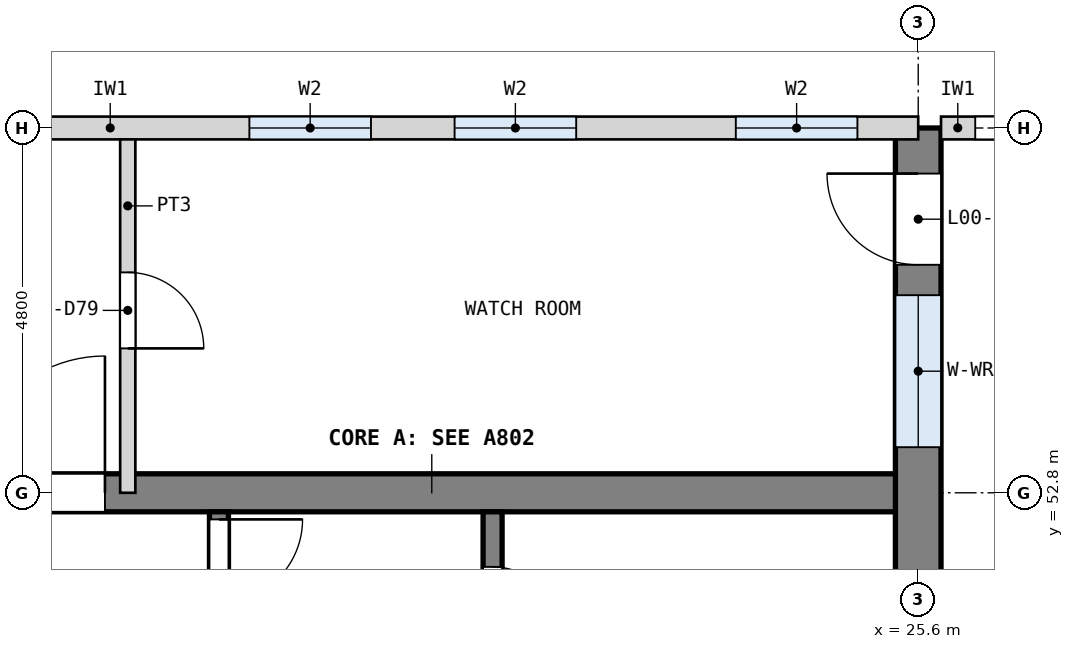
"""IFC4 building model, lengths in metres.
Left out: names, types, materials, properties, quantities, classifications, styles, units other than length and angle.
Written with IfcOpenShell. Run it as: python <this file> out.ifc"""

import sys

from ifc_helpers import new_model, si_unit, direction, frame, frame_2d, origin, place, context, subcontext, project, spatial, rectangle, extrude, element, fill, save


model = new_model("IFC4")
c1 = context("Model", 3, precision=1e-05, world=origin(), true_north=direction((0.0, 1.0)))
c2 = subcontext(c1, "Body", "Model", "MODEL_VIEW")
j1 = project(units=[si_unit("LENGTHUNIT", "METRE"), si_unit("PLANEANGLEUNIT", "RADIAN")], contexts=[c1])
p1 = place(None, origin())
s1 = spatial("IfcSite", under=j1, at=p1, CompositionType="ELEMENT")
p2 = place(p1, origin())
s2 = spatial("IfcBuilding", under=s1, at=p2, CompositionType="ELEMENT")
p3 = place(p2, origin())
s3 = spatial("IfcBuildingStorey", under=s2, at=p3, CompositionType="ELEMENT", Elevation=0.0)
p4 = place(p3, frame((12.55, 52.8, 0.0), z_axis=(0.0, 0.0, 1.0), x_axis=(1.0, 0.0, 0.0)))
e1 = element("IfcWall", 1, at=p4, inside=s3, PredefinedType="SHEAR", context=c2, shape_type="SweptSolid", body=[
    extrude(rectangle(XDim=13.3, YDim=0.5, at=frame_2d((6.65, 0.0))), origin(), (0.0, 0.0, 1.0), 4.2),
])
p5 = place(p4, frame((0.55, 0.0, 0.0)))
e2 = element("IfcOpeningElement", 2, at=p5, cuts=e1, PredefinedType="OPENING", context=c2, shape_type="SweptSolid", body=[
    extrude(rectangle(XDim=1.8, YDim=2.1, at=frame_2d((0.9, 1.05))), frame((0.0, 0.26, 0.0), z_axis=(0.0, -1.0, 0.0), x_axis=(1.0, 0.0, 0.0)), (0.0, 0.0, 1.0), 0.52),
])
p6 = place(p3, frame((25.6, 28.8, 0.0), z_axis=(0.0, 0.0, 1.0), x_axis=(0.0, 1.0, 0.0)))
e3 = element("IfcWall", 3, at=p6, inside=s3, PredefinedType="SHEAR", context=c2, shape_type="SweptSolid", body=[
    extrude(rectangle(XDim=28.8, YDim=0.6, at=frame_2d((14.4, 0.0))), origin(), (0.0, 0.0, 1.0), 4.2),
])
p7 = place(p6, frame((0.5, 0.0, 0.0)))
e4 = element("IfcOpeningElement", 4, at=p7, cuts=e3, PredefinedType="OPENING", context=c2, shape_type="SweptSolid", body=[
    extrude(rectangle(XDim=1.2, YDim=2.1, at=frame_2d((0.6, 1.05))), frame((0.0, 0.31, 0.0), z_axis=(0.0, -1.0, 0.0), x_axis=(1.0, 0.0, 0.0)), (0.0, 0.0, 1.0), 0.62),
])
p8 = place(p6, frame((3.1, 0.0, 0.0)))
e5 = element("IfcOpeningElement", 5, at=p8, cuts=e3, PredefinedType="OPENING", context=c2, shape_type="SweptSolid", body=[
    extrude(rectangle(XDim=1.2, YDim=2.1, at=frame_2d((0.6, 1.05))), frame((0.0, 0.31, 0.0), z_axis=(0.0, -1.0, 0.0), x_axis=(1.0, 0.0, 0.0)), (0.0, 0.0, 1.0), 0.62),
])
p9 = place(p6, frame((27.0, 0.0, 0.0)))
e6 = element("IfcOpeningElement", 6, at=p9, cuts=e3, PredefinedType="OPENING", context=c2, shape_type="SweptSolid", body=[
    extrude(rectangle(XDim=1.2, YDim=2.1, at=frame_2d((0.6, 1.05))), frame((0.0, 0.31, 0.0), z_axis=(0.0, -1.0, 0.0), x_axis=(1.0, 0.0, 0.0)), (0.0, 0.0, 1.0), 0.62),
])
p10 = place(p6, frame((24.6, 0.0, 1.0)))
e7 = element("IfcOpeningElement", 7, at=p10, cuts=e3, PredefinedType="OPENING", context=c2, shape_type="SweptSolid", body=[
    extrude(rectangle(XDim=2.0, YDim=1.2, at=frame_2d((1.0, 0.6))), frame((0.0, 0.31, 0.0), z_axis=(0.0, -1.0, 0.0), x_axis=(1.0, 0.0, 0.0)), (0.0, 0.0, 1.0), 0.62),
])
p11 = place(p3, frame((13.15, 57.6, 0.0), z_axis=(0.0, 0.0, 1.0), x_axis=(1.0, 0.0, 0.0)))
e8 = element("IfcWall", 8, at=p11, inside=s3, PredefinedType="SOLIDWALL", context=c2, shape_type="SweptSolid", body=[
    extrude(rectangle(XDim=12.45, YDim=0.3, at=frame_2d((6.225, 0.0))), origin(), (0.0, 0.0, 1.0), 3.0),
])
p12 = place(p11, frame((6.35, 0.0, 0.3)))
e9 = element("IfcOpeningElement", 9, at=p12, cuts=e8, PredefinedType="OPENING", context=c2, shape_type="SweptSolid", body=[
    extrude(rectangle(XDim=1.6, YDim=2.4, at=frame_2d((0.8, 1.2))), frame((0.0, 0.16, 0.0), z_axis=(0.0, -1.0, 0.0), x_axis=(1.0, 0.0, 0.0)), (0.0, 0.0, 1.0), 0.32),
])
p13 = place(p11, frame((3.65, 0.0, 0.3)))
e10 = element("IfcOpeningElement", 10, at=p13, cuts=e8, PredefinedType="OPENING", context=c2, shape_type="SweptSolid", body=[
    extrude(rectangle(XDim=1.6, YDim=2.4, at=frame_2d((0.8, 1.2))), frame((0.0, 0.16, 0.0), z_axis=(0.0, -1.0, 0.0), x_axis=(1.0, 0.0, 0.0)), (0.0, 0.0, 1.0), 0.32),
])
p14 = place(p11, frame((10.05, 0.0, 0.3)))
e11 = element("IfcOpeningElement", 11, at=p14, cuts=e8, PredefinedType="OPENING", context=c2, shape_type="SweptSolid", body=[
    extrude(rectangle(XDim=1.6, YDim=2.4, at=frame_2d((0.8, 1.2))), frame((0.0, 0.16, 0.0), z_axis=(0.0, -1.0, 0.0), x_axis=(1.0, 0.0, 0.0)), (0.0, 0.0, 1.0), 0.32),
])
p15 = place(p3, frame((25.9, 57.6, 0.0), z_axis=(0.0, 0.0, 1.0), x_axis=(1.0, 0.0, 0.0)))
e12 = element("IfcWall", 12, at=p15, inside=s3, PredefinedType="SOLIDWALL", context=c2, shape_type="SweptSolid", body=[
    extrude(rectangle(XDim=5.3, YDim=0.3, at=frame_2d((2.65, 0.0))), origin(), (0.0, 0.0, 1.0), 5.1),
])
p16 = place(p15, frame((0.45, 0.0, 0.0)))
e13 = element("IfcOpeningElement", 13, at=p16, cuts=e12, PredefinedType="OPENING", context=c2, shape_type="SweptSolid", body=[
    extrude(rectangle(XDim=4.4, YDim=4.5, at=frame_2d((2.2, 2.25))), frame((0.0, 0.16, 0.0), z_axis=(0.0, -1.0, 0.0), x_axis=(1.0, 0.0, 0.0)), (0.0, 0.0, 1.0), 0.32),
])
p17 = place(p3, frame((16.4, 46.475, 0.0), z_axis=(0.0, 0.0, 1.0), x_axis=(0.0, 1.0, 0.0)))
e14 = element("IfcWall", 14, at=p17, inside=s3, PredefinedType="SOLIDWALL", context=c2, shape_type="SweptSolid", body=[
    extrude(rectangle(XDim=6.075, YDim=0.25, at=frame_2d((3.038, 0.0))), origin(), (0.0, 0.0, 1.0), 3.9),
])
p18 = place(p17, frame((4.875, 0.0, 0.0)))
e15 = element("IfcOpeningElement", 15, at=p18, cuts=e14, PredefinedType="OPENING", context=c2, shape_type="SweptSolid", body=[
    extrude(rectangle(XDim=1.1, YDim=2.1, at=frame_2d((0.55, 1.05))), frame((0.0, 0.135, 0.0), z_axis=(0.0, -1.0, 0.0), x_axis=(1.0, 0.0, 0.0)), (0.0, 0.0, 1.0), 0.27),
])
p19 = place(p3, frame((20.0, 46.475, 0.0), z_axis=(0.0, 0.0, 1.0), x_axis=(0.0, 1.0, 0.0)))
e16 = element("IfcWall", 16, at=p19, inside=s3, PredefinedType="SOLIDWALL", context=c2, shape_type="SweptSolid", body=[
    extrude(rectangle(XDim=6.075, YDim=0.25, at=frame_2d((3.038, 0.0))), origin(), (0.0, 0.0, 1.0), 3.9),
])
p20 = place(p19, frame((1.312, 0.0, 0.0)))
e17 = element("IfcOpeningElement", 17, at=p20, cuts=e16, PredefinedType="OPENING", context=c2, shape_type="SweptSolid", body=[
    extrude(rectangle(XDim=1.0, YDim=2.1, at=frame_2d((0.5, 1.05))), frame((0.0, 0.135, 0.0), z_axis=(0.0, -1.0, 0.0), x_axis=(1.0, 0.0, 0.0)), (0.0, 0.0, 1.0), 0.27),
])
p21 = place(p19, frame((4.45, 0.0, 0.0)))
e18 = element("IfcOpeningElement", 18, at=p21, cuts=e16, PredefinedType="OPENING", context=c2, shape_type="SweptSolid", body=[
    extrude(rectangle(XDim=0.9, YDim=2.1, at=frame_2d((0.45, 1.05))), frame((0.0, 0.135, 0.0), z_axis=(0.0, -1.0, 0.0), x_axis=(1.0, 0.0, 0.0)), (0.0, 0.0, 1.0), 0.27),
])
p22 = place(p3, frame((15.2, 52.8, 0.0), z_axis=(0.0, 0.0, 1.0), x_axis=(0.0, 1.0, 0.0)))
e19 = element("IfcWall", 19, at=p22, inside=s3, PredefinedType="PARTITIONING", context=c2, shape_type="SweptSolid", body=[
    extrude(rectangle(XDim=4.65, YDim=0.2, at=frame_2d((2.325, 0.0))), origin(), (0.0, 0.0, 1.0), 3.9),
])
p23 = place(p22, frame((1.9, 0.0, 0.0)))
e20 = element("IfcOpeningElement", 20, at=p23, cuts=e19, PredefinedType="OPENING", context=c2, shape_type="SweptSolid", body=[
    extrude(rectangle(XDim=1.0, YDim=2.1, at=frame_2d((0.5, 1.05))), frame((0.0, 0.11, 0.0), z_axis=(0.0, -1.0, 0.0), x_axis=(1.0, 0.0, 0.0)), (0.0, 0.0, 1.0), 0.22),
])
p24 = place(p16, origin())
e21 = element("IfcDoor", 21, at=p24, inside=s3, OperationType="ROLLINGUP", PredefinedType="DOOR", context=c2, shape_type="SweptSolid", body=[
    extrude(rectangle(XDim=4.4, YDim=4.5, at=frame_2d((2.2, 2.25))), frame((0.0, 0.025, 0.0), z_axis=(0.0, -1.0, 0.0), x_axis=(1.0, 0.0, 0.0)), (0.0, 0.0, 1.0), 0.05),
])
fill(e13, e21)
p25 = place(p18, frame((1.1, 0.0, 0.0), z_axis=(0.0, 0.0, 1.0), x_axis=(-1.0, 0.0, 0.0)))
e22 = element("IfcDoor", 22, at=p25, inside=s3, OperationType="SINGLE_SWING_LEFT", PredefinedType="DOOR", context=c2, shape_type="SweptSolid", body=[
    extrude(rectangle(XDim=1.1, YDim=2.1, at=frame_2d((0.55, 1.05))), frame((0.0, 0.025, 0.0), z_axis=(0.0, -1.0, 0.0), x_axis=(1.0, 0.0, 0.0)), (0.0, 0.0, 1.0), 0.05),
])
fill(e15, e22)
p26 = place(p21, frame((0.9, 0.0, 0.0), z_axis=(0.0, 0.0, 1.0), x_axis=(-1.0, 0.0, 0.0)))
e23 = element("IfcDoor", 23, at=p26, inside=s3, OperationType="SINGLE_SWING_RIGHT", PredefinedType="DOOR", context=c2, shape_type="SweptSolid", body=[
    extrude(rectangle(XDim=0.9, YDim=2.1, at=frame_2d((0.45, 1.05))), frame((0.0, 0.025, 0.0), z_axis=(0.0, -1.0, 0.0), x_axis=(1.0, 0.0, 0.0)), (0.0, 0.0, 1.0), 0.05),
])
fill(e18, e23)
p27 = place(p5, origin())
e24 = element("IfcDoor", 24, at=p27, inside=s3, OperationType="SINGLE_SWING_RIGHT", PredefinedType="DOOR", context=c2, shape_type="SweptSolid", body=[
    extrude(rectangle(XDim=1.8, YDim=2.1, at=frame_2d((0.9, 1.05))), frame((0.0, 0.025, 0.0), z_axis=(0.0, -1.0, 0.0), x_axis=(1.0, 0.0, 0.0)), (0.0, 0.0, 1.0), 0.05),
])
fill(e2, e24)
p28 = place(p23, frame((1.0, 0.0, 0.0), z_axis=(0.0, 0.0, 1.0), x_axis=(-1.0, 0.0, 0.0)))
e25 = element("IfcDoor", 25, at=p28, inside=s3, OperationType="SINGLE_SWING_RIGHT", PredefinedType="DOOR", context=c2, shape_type="SweptSolid", body=[
    extrude(rectangle(XDim=1.0, YDim=2.1, at=frame_2d((0.5, 1.05))), frame((0.0, 0.025, 0.0), z_axis=(0.0, -1.0, 0.0), x_axis=(1.0, 0.0, 0.0)), (0.0, 0.0, 1.0), 0.05),
])
fill(e20, e25)
p29 = place(p9, origin())
e26 = element("IfcDoor", 26, at=p29, inside=s3, OperationType="SINGLE_SWING_RIGHT", PredefinedType="DOOR", context=c2, shape_type="SweptSolid", body=[
    extrude(rectangle(XDim=1.2, YDim=2.1, at=frame_2d((0.6, 1.05))), frame((0.0, 0.025, 0.0), z_axis=(0.0, -1.0, 0.0), x_axis=(1.0, 0.0, 0.0)), (0.0, 0.0, 1.0), 0.05),
])
fill(e6, e26)
p30 = place(p10, origin())
e27 = element("IfcWindow", 27, at=p30, inside=s3, PartitioningType="SINGLE_PANEL", PredefinedType="WINDOW", context=c2, shape_type="SweptSolid", body=[
    extrude(rectangle(XDim=2.0, YDim=1.2, at=frame_2d((1.0, 0.6))), frame((0.0, 0.03, 0.0), z_axis=(0.0, -1.0, 0.0), x_axis=(1.0, 0.0, 0.0)), (0.0, 0.0, 1.0), 0.06),
])
fill(e7, e27)
p31 = place(p12, origin())
e28 = element("IfcWindow", 28, at=p31, inside=s3, PartitioningType="SINGLE_PANEL", PredefinedType="WINDOW", context=c2, shape_type="SweptSolid", body=[
    extrude(rectangle(XDim=1.6, YDim=2.4, at=frame_2d((0.8, 1.2))), frame((0.0, 0.03, 0.0), z_axis=(0.0, -1.0, 0.0), x_axis=(1.0, 0.0, 0.0)), (0.0, 0.0, 1.0), 0.06),
])
fill(e9, e28)
p32 = place(p13, origin())
e29 = element("IfcWindow", 29, at=p32, inside=s3, PartitioningType="SINGLE_PANEL", PredefinedType="WINDOW", context=c2, shape_type="SweptSolid", body=[
    extrude(rectangle(XDim=1.6, YDim=2.4, at=frame_2d((0.8, 1.2))), frame((0.0, 0.03, 0.0), z_axis=(0.0, -1.0, 0.0), x_axis=(1.0, 0.0, 0.0)), (0.0, 0.0, 1.0), 0.06),
])
fill(e10, e29)
p33 = place(p14, origin())
e30 = element("IfcWindow", 30, at=p33, inside=s3, PartitioningType="SINGLE_PANEL", PredefinedType="WINDOW", context=c2, shape_type="SweptSolid", body=[
    extrude(rectangle(XDim=1.6, YDim=2.4, at=frame_2d((0.8, 1.2))), frame((0.0, 0.03, 0.0), z_axis=(0.0, -1.0, 0.0), x_axis=(1.0, 0.0, 0.0)), (0.0, 0.0, 1.0), 0.06),
])
fill(e11, e30)
save(model, sys.argv[1])
